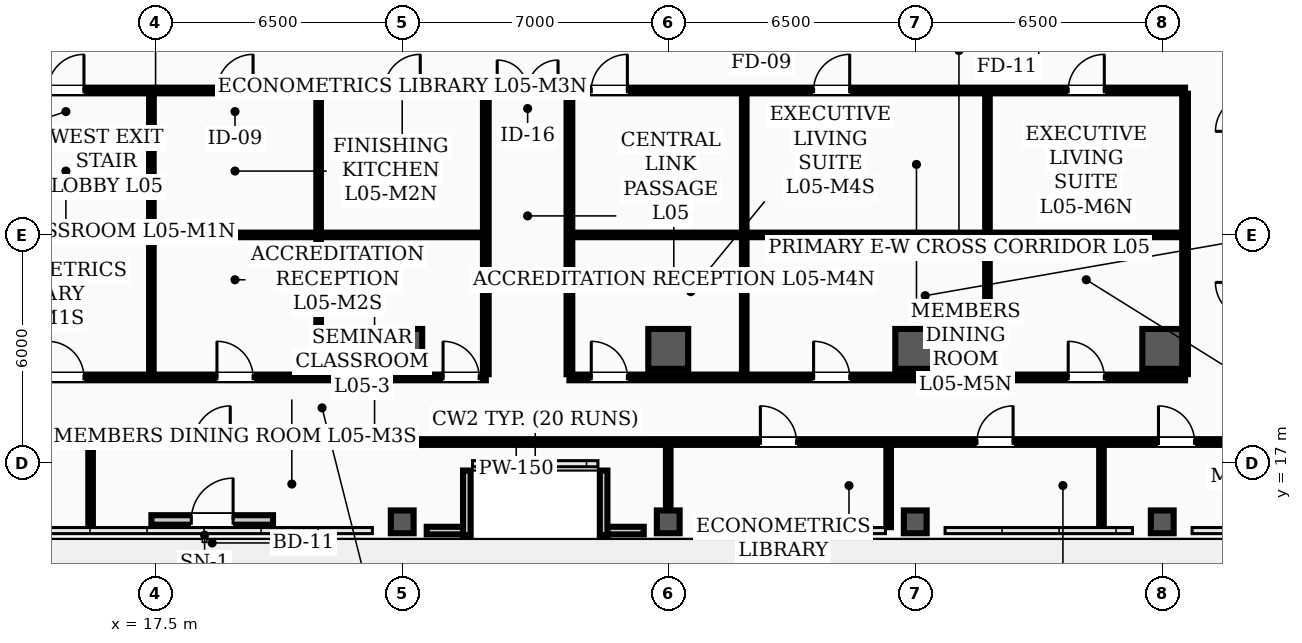
"""IFC4 building model, lengths in metres.
Left out: names, types, materials, properties, quantities, classifications, styles, units other than length and angle.
Written with IfcOpenShell. Run it as: python <this file> out.ifc"""

import sys

from ifc_helpers import new_model, si_unit, direction, frame, frame_2d, origin, origin_2d, place, context, subcontext, project, spatial, rectangle, hollow_rectangle, extrude, element, fill, save


model = new_model("IFC4")
c1 = context("Model", 3, precision=1e-05, world=origin(), true_north=direction((0.0, 1.0)))
c2 = subcontext(c1, "Body", "Model", "MODEL_VIEW")
j1 = project(units=[si_unit("LENGTHUNIT", "METRE"), si_unit("PLANEANGLEUNIT", "RADIAN")], contexts=[c1])
p1 = place(None, origin())
s1 = spatial("IfcSite", under=j1, at=p1, CompositionType="ELEMENT")
p2 = place(p1, origin())
s2 = spatial("IfcBuilding", under=s1, at=p2, CompositionType="ELEMENT")
p3 = place(p2, frame((0.0, 0.0, 22.0)))
s3 = spatial("IfcBuildingStorey", under=s2, at=p3, CompositionType="ELEMENT", Elevation=22.0)
for number, where, z_axis, x_axis in (
    (1, (24.0, 20.0, 0.0), (0.0, 0.0, 1.0), (1.0, 0.0, 0.0)),
    (2, (31.0, 20.0, 0.0), (0.0, 0.0, 1.0), (1.0, 0.0, 0.0)),
    (3, (37.5, 20.0, 0.0), (0.0, 0.0, 1.0), (1.0, 0.0, 0.0)),
    (4, (44.0, 20.0, 0.0), (0.0, 0.0, 1.0), (1.0, 0.0, 0.0)),
):
    element("IfcColumn", number, at=place(p3, frame(where, z_axis=z_axis, x_axis=x_axis)), inside=s3, PredefinedType="COLUMN", context=c2, shape_type="SweptSolid", body=[
        extrude(hollow_rectangle(XDim=1.05, YDim=1.05, WallThickness=0.038, InnerFilletRadius=0.019, OuterFilletRadius=0.057, at=origin_2d()), origin(), (0.0, 0.0, 1.0), 4.5),
    ])
for number, where, z_axis, x_axis in (
    (5, (24.0, 15.45, 0.0), (0.0, 0.0, 1.0), (1.0, 0.0, 0.0)),
    (6, (31.0, 15.45, 0.0), (0.0, 0.0, 1.0), (1.0, 0.0, 0.0)),
    (7, (37.5, 15.45, 0.0), (0.0, 0.0, 1.0), (1.0, 0.0, 0.0)),
    (8, (44.0, 15.45, 0.0), (0.0, 0.0, 1.0), (1.0, 0.0, 0.0)),
):
    element("IfcColumn", number, at=place(p3, frame(where, z_axis=z_axis, x_axis=x_axis)), inside=s3, PredefinedType="COLUMN", context=c2, shape_type="SweptSolid", body=[
        extrude(hollow_rectangle(XDim=0.6, YDim=0.6, WallThickness=0.026, InnerFilletRadius=0.013, OuterFilletRadius=0.039, at=origin_2d()), origin(), (0.0, 0.0, 1.0), 4.5),
    ])
for number, where, z_axis, x_axis in (
    (9, (24.645, 15.22, 0.0), (0.0, 0.0, 1.0), (1.0, 0.0, 0.0)),
    (10, (29.35, 15.22, 0.0), (0.0, 0.0, 1.0), (1.0, 0.0, 0.0)),
):
    element("IfcWall", number, at=place(p3, frame(where, z_axis=z_axis, x_axis=x_axis)), inside=s3, PredefinedType="PARAPET", context=c2, shape_type="SweptSolid", body=[
        extrude(rectangle(XDim=1.005, YDim=0.2, at=frame_2d((0.502, 0.0))), origin(), (0.0, 0.0, 1.0), 1.2),
    ])
for number, where, z_axis, x_axis in (
    (11, (25.7, 15.1, 0.0), (0.0, 0.0, 1.0), (0.0, 1.0, 0.0)),
    (12, (29.3, 16.8, 0.0), (0.0, 0.0, 1.0), (0.0, -1.0, 0.0)),
):
    element("IfcWall", number, at=place(p3, frame(where, z_axis=z_axis, x_axis=x_axis)), inside=s3, PredefinedType="PARAPET", context=c2, shape_type="SweptSolid", body=[
        extrude(rectangle(XDim=1.7, YDim=0.2, at=frame_2d((0.85, 0.0))), origin(), (0.0, 0.0, 1.0), 1.2),
    ])
p4 = place(p3, frame((17.4, 15.5, 0.0), z_axis=(0.0, 0.0, 1.0), x_axis=(1.0, 0.0, 0.0)))
e13 = element("IfcWall", 13, at=p4, inside=s3, PredefinedType="STANDARD", context=c2, shape_type="SweptSolid", body=[
    extrude(rectangle(XDim=3.2, YDim=0.25, at=frame_2d((1.6, 0.0))), origin(), (0.0, 0.0, 1.0), 3.2),
])
p5 = place(p4, frame((1.05, 0.0, 0.0)))
e14 = element("IfcOpeningElement", 14, at=p5, cuts=e13, PredefinedType="OPENING", context=c2, shape_type="SweptSolid", body=[
    extrude(rectangle(XDim=1.1, YDim=2.2, at=frame_2d((0.55, 1.1))), frame((0.0, 0.135, 0.0), z_axis=(0.0, -1.0, 0.0), x_axis=(1.0, 0.0, 0.0)), (0.0, 0.0, 1.0), 0.27),
])
p6 = place(p3, frame((12.9, 26.8, 0.0), z_axis=(0.0, 0.0, 1.0), x_axis=(1.0, 0.0, 0.0)))
e15 = element("IfcWall", 15, at=p6, inside=s3, PredefinedType="PARTITIONING", context=c2, shape_type="SweptSolid", body=[
    extrude(rectangle(XDim=31.7, YDim=0.15, at=frame_2d((15.85, 0.0))), origin(), (0.0, 0.0, 1.0), 3.7),
])
p7 = place(p6, frame((13.6, 0.0, 0.0)))
e16 = element("IfcOpeningElement", 16, at=p7, cuts=e15, PredefinedType="OPENING", context=c2, shape_type="SweptSolid", body=[
    extrude(rectangle(XDim=1.6, YDim=2.08, at=frame_2d((0.8, 1.04))), frame((0.0, 0.085, 0.0), z_axis=(0.0, -1.0, 0.0), x_axis=(1.0, 0.0, 0.0)), (0.0, 0.0, 1.0), 0.17),
])
p8 = place(p6, frame((1.775, 0.0, 0.0)))
e17 = element("IfcOpeningElement", 17, at=p8, cuts=e15, PredefinedType="OPENING", context=c2, shape_type="SweptSolid", body=[
    extrude(rectangle(XDim=0.95, YDim=2.08, at=frame_2d((0.475, 1.04))), frame((0.0, 0.085, 0.0), z_axis=(0.0, -1.0, 0.0), x_axis=(1.0, 0.0, 0.0)), (0.0, 0.0, 1.0), 0.17),
])
p9 = place(p6, frame((6.225, 0.0, 0.0)))
e18 = element("IfcOpeningElement", 18, at=p9, cuts=e15, PredefinedType="OPENING", context=c2, shape_type="SweptSolid", body=[
    extrude(rectangle(XDim=0.95, YDim=2.08, at=frame_2d((0.475, 1.04))), frame((0.0, 0.085, 0.0), z_axis=(0.0, -1.0, 0.0), x_axis=(1.0, 0.0, 0.0)), (0.0, 0.0, 1.0), 0.17),
])
p10 = place(p6, frame((10.625, 0.0, 0.0)))
e19 = element("IfcOpeningElement", 19, at=p10, cuts=e15, PredefinedType="OPENING", context=c2, shape_type="SweptSolid", body=[
    extrude(rectangle(XDim=0.95, YDim=2.08, at=frame_2d((0.475, 1.04))), frame((0.0, 0.085, 0.0), z_axis=(0.0, -1.0, 0.0), x_axis=(1.0, 0.0, 0.0)), (0.0, 0.0, 1.0), 0.17),
])
p11 = place(p6, frame((16.075, 0.0, 0.0)))
e20 = element("IfcOpeningElement", 20, at=p11, cuts=e15, PredefinedType="OPENING", context=c2, shape_type="SweptSolid", body=[
    extrude(rectangle(XDim=0.95, YDim=2.08, at=frame_2d((0.475, 1.04))), frame((0.0, 0.085, 0.0), z_axis=(0.0, -1.0, 0.0), x_axis=(1.0, 0.0, 0.0)), (0.0, 0.0, 1.0), 0.17),
])
p12 = place(p6, frame((21.925, 0.0, 0.0)))
e21 = element("IfcOpeningElement", 21, at=p12, cuts=e15, PredefinedType="OPENING", context=c2, shape_type="SweptSolid", body=[
    extrude(rectangle(XDim=0.95, YDim=2.08, at=frame_2d((0.475, 1.04))), frame((0.0, 0.085, 0.0), z_axis=(0.0, -1.0, 0.0), x_axis=(1.0, 0.0, 0.0)), (0.0, 0.0, 1.0), 0.17),
])
p13 = place(p6, frame((28.625, 0.0, 0.0)))
e22 = element("IfcOpeningElement", 22, at=p13, cuts=e15, PredefinedType="OPENING", context=c2, shape_type="SweptSolid", body=[
    extrude(rectangle(XDim=0.95, YDim=2.08, at=frame_2d((0.475, 1.04))), frame((0.0, 0.085, 0.0), z_axis=(0.0, -1.0, 0.0), x_axis=(1.0, 0.0, 0.0)), (0.0, 0.0, 1.0), 0.17),
])
p14 = place(p3, frame((4.66, 17.55, 0.0), z_axis=(0.0, 0.0, 1.0), x_axis=(1.0, 0.0, 0.0)))
e23 = element("IfcWall", 23, at=p14, inside=s3, PredefinedType="PARTITIONING", context=c2, shape_type="SweptSolid", body=[
    extrude(rectangle(XDim=44.68, YDim=0.15, at=frame_2d((22.34, 0.0))), origin(), (0.0, 0.0, 1.0), 3.7),
])
p15 = place(p14, frame((6.74, 0.0, 0.0)))
e24 = element("IfcOpeningElement", 24, at=p15, cuts=e23, PredefinedType="OPENING", context=c2, shape_type="SweptSolid", body=[
    extrude(rectangle(XDim=0.95, YDim=2.08, at=frame_2d((0.475, 1.04))), frame((0.0, 0.085, 0.0), z_axis=(0.0, -1.0, 0.0), x_axis=(1.0, 0.0, 0.0)), (0.0, 0.0, 1.0), 0.17),
])
p16 = place(p14, frame((13.865, 0.0, 0.0)))
e25 = element("IfcOpeningElement", 25, at=p16, cuts=e23, PredefinedType="OPENING", context=c2, shape_type="SweptSolid", body=[
    extrude(rectangle(XDim=0.95, YDim=2.08, at=frame_2d((0.475, 1.04))), frame((0.0, 0.085, 0.0), z_axis=(0.0, -1.0, 0.0), x_axis=(1.0, 0.0, 0.0)), (0.0, 0.0, 1.0), 0.17),
])
p17 = place(p14, frame((28.765, 0.0, 0.0)))
e26 = element("IfcOpeningElement", 26, at=p17, cuts=e23, PredefinedType="OPENING", context=c2, shape_type="SweptSolid", body=[
    extrude(rectangle(XDim=0.95, YDim=2.08, at=frame_2d((0.475, 1.04))), frame((0.0, 0.085, 0.0), z_axis=(0.0, -1.0, 0.0), x_axis=(1.0, 0.0, 0.0)), (0.0, 0.0, 1.0), 0.17),
])
p18 = place(p14, frame((34.465, 0.0, 0.0)))
e27 = element("IfcOpeningElement", 27, at=p18, cuts=e23, PredefinedType="OPENING", context=c2, shape_type="SweptSolid", body=[
    extrude(rectangle(XDim=0.95, YDim=2.08, at=frame_2d((0.475, 1.04))), frame((0.0, 0.085, 0.0), z_axis=(0.0, -1.0, 0.0), x_axis=(1.0, 0.0, 0.0)), (0.0, 0.0, 1.0), 0.17),
])
p19 = place(p14, frame((39.24, 0.0, 0.0)))
e28 = element("IfcOpeningElement", 28, at=p19, cuts=e23, PredefinedType="OPENING", context=c2, shape_type="SweptSolid", body=[
    extrude(rectangle(XDim=0.95, YDim=2.08, at=frame_2d((0.475, 1.04))), frame((0.0, 0.085, 0.0), z_axis=(0.0, -1.0, 0.0), x_axis=(1.0, 0.0, 0.0)), (0.0, 0.0, 1.0), 0.17),
])
p20 = place(p3, frame((12.9, 19.25, 0.0), z_axis=(0.0, 0.0, 1.0), x_axis=(1.0, 0.0, 0.0)))
e29 = element("IfcWall", 29, at=p20, inside=s3, PredefinedType="PARTITIONING", context=c2, shape_type="SweptSolid", body=[
    extrude(rectangle(XDim=13.3, YDim=0.15, at=frame_2d((6.65, 0.0))), origin(), (0.0, 0.0, 1.0), 3.7),
])
p21 = place(p20, frame((1.775, 0.0, 0.0)))
e30 = element("IfcOpeningElement", 30, at=p21, cuts=e29, PredefinedType="OPENING", context=c2, shape_type="SweptSolid", body=[
    extrude(rectangle(XDim=0.95, YDim=2.08, at=frame_2d((0.475, 1.04))), frame((0.0, 0.085, 0.0), z_axis=(0.0, -1.0, 0.0), x_axis=(1.0, 0.0, 0.0)), (0.0, 0.0, 1.0), 0.17),
])
p22 = place(p20, frame((6.225, 0.0, 0.0)))
e31 = element("IfcOpeningElement", 31, at=p22, cuts=e29, PredefinedType="OPENING", context=c2, shape_type="SweptSolid", body=[
    extrude(rectangle(XDim=0.95, YDim=2.08, at=frame_2d((0.475, 1.04))), frame((0.0, 0.085, 0.0), z_axis=(0.0, -1.0, 0.0), x_axis=(1.0, 0.0, 0.0)), (0.0, 0.0, 1.0), 0.17),
])
p23 = place(p20, frame((12.175, 0.0, 0.0)))
e32 = element("IfcOpeningElement", 32, at=p23, cuts=e29, PredefinedType="OPENING", context=c2, shape_type="SweptSolid", body=[
    extrude(rectangle(XDim=0.95, YDim=2.08, at=frame_2d((0.475, 1.04))), frame((0.0, 0.085, 0.0), z_axis=(0.0, -1.0, 0.0), x_axis=(1.0, 0.0, 0.0)), (0.0, 0.0, 1.0), 0.17),
])
p24 = place(p3, frame((28.4, 19.25, 0.0), z_axis=(0.0, 0.0, 1.0), x_axis=(1.0, 0.0, 0.0)))
e33 = element("IfcWall", 33, at=p24, inside=s3, PredefinedType="PARTITIONING", context=c2, shape_type="SweptSolid", body=[
    extrude(rectangle(XDim=16.2, YDim=0.15, at=frame_2d((8.1, 0.0))), origin(), (0.0, 0.0, 1.0), 3.7),
])
p25 = place(p24, frame((0.575, 0.0, 0.0)))
e34 = element("IfcOpeningElement", 34, at=p25, cuts=e33, PredefinedType="OPENING", context=c2, shape_type="SweptSolid", body=[
    extrude(rectangle(XDim=0.95, YDim=2.08, at=frame_2d((0.475, 1.04))), frame((0.0, 0.085, 0.0), z_axis=(0.0, -1.0, 0.0), x_axis=(1.0, 0.0, 0.0)), (0.0, 0.0, 1.0), 0.17),
])
p26 = place(p24, frame((6.425, 0.0, 0.0)))
e35 = element("IfcOpeningElement", 35, at=p26, cuts=e33, PredefinedType="OPENING", context=c2, shape_type="SweptSolid", body=[
    extrude(rectangle(XDim=0.95, YDim=2.08, at=frame_2d((0.475, 1.04))), frame((0.0, 0.085, 0.0), z_axis=(0.0, -1.0, 0.0), x_axis=(1.0, 0.0, 0.0)), (0.0, 0.0, 1.0), 0.17),
])
p27 = place(p24, frame((13.125, 0.0, 0.0)))
e36 = element("IfcOpeningElement", 36, at=p27, cuts=e33, PredefinedType="OPENING", context=c2, shape_type="SweptSolid", body=[
    extrude(rectangle(XDim=0.95, YDim=2.08, at=frame_2d((0.475, 1.04))), frame((0.0, 0.085, 0.0), z_axis=(0.0, -1.0, 0.0), x_axis=(1.0, 0.0, 0.0)), (0.0, 0.0, 1.0), 0.17),
])
p28 = place(p3, frame((12.9, 23.0, 0.0), z_axis=(0.0, 0.0, 1.0), x_axis=(1.0, 0.0, 0.0)))
e37 = element("IfcWall", 37, at=p28, inside=s3, PredefinedType="PARTITIONING", context=c2, shape_type="SweptSolid", body=[
    extrude(rectangle(XDim=4.5, YDim=0.12, at=frame_2d((2.25, 0.0))), origin(), (0.0, 0.0, 1.0), 3.7),
])
p29 = place(p3, frame((17.4, 23.0, 0.0), z_axis=(0.0, 0.0, 1.0), x_axis=(1.0, 0.0, 0.0)))
e38 = element("IfcWall", 38, at=p29, inside=s3, PredefinedType="PARTITIONING", context=c2, shape_type="SweptSolid", body=[
    extrude(rectangle(XDim=4.4, YDim=0.12, at=frame_2d((2.2, 0.0))), origin(), (0.0, 0.0, 1.0), 3.9),
])
p30 = place(p3, frame((21.8, 23.0, 0.0), z_axis=(0.0, 0.0, 1.0), x_axis=(1.0, 0.0, 0.0)))
e39 = element("IfcWall", 39, at=p30, inside=s3, PredefinedType="PARTITIONING", context=c2, shape_type="SweptSolid", body=[
    extrude(rectangle(XDim=4.4, YDim=0.12, at=frame_2d((2.2, 0.0))), origin(), (0.0, 0.0, 1.0), 3.7),
])
p31 = place(p3, frame((28.4, 23.0, 0.0), z_axis=(0.0, 0.0, 1.0), x_axis=(1.0, 0.0, 0.0)))
e40 = element("IfcWall", 40, at=p31, inside=s3, PredefinedType="PARTITIONING", context=c2, shape_type="SweptSolid", body=[
    extrude(rectangle(XDim=4.6, YDim=0.12, at=frame_2d((2.3, 0.0))), origin(), (0.0, 0.0, 1.0), 3.7),
])
p32 = place(p3, frame((33.0, 23.0, 0.0), z_axis=(0.0, 0.0, 1.0), x_axis=(1.0, 0.0, 0.0)))
e41 = element("IfcWall", 41, at=p32, inside=s3, PredefinedType="PARTITIONING", context=c2, shape_type="SweptSolid", body=[
    extrude(rectangle(XDim=6.4, YDim=0.12, at=frame_2d((3.2, 0.0))), origin(), (0.0, 0.0, 1.0), 3.7),
])
p33 = place(p3, frame((39.4, 23.0, 0.0), z_axis=(0.0, 0.0, 1.0), x_axis=(1.0, 0.0, 0.0)))
e42 = element("IfcWall", 42, at=p33, inside=s3, PredefinedType="PARTITIONING", context=c2, shape_type="SweptSolid", body=[
    extrude(rectangle(XDim=5.2, YDim=0.12, at=frame_2d((2.6, 0.0))), origin(), (0.0, 0.0, 1.0), 3.7),
])
for number, where, z_axis, x_axis in (
    (43, (26.2, 19.335, 0.0), (0.0, 0.0, 1.0), (0.0, 1.0, 0.0)),
    (44, (28.4, 19.335, 0.0), (0.0, 0.0, 1.0), (0.0, 1.0, 0.0)),
    (45, (44.6, 19.335, 0.0), (0.0, 0.0, 1.0), (0.0, 1.0, 0.0)),
):
    element("IfcWall", number, at=place(p3, frame(where, z_axis=z_axis, x_axis=x_axis)), inside=s3, PredefinedType="PARTITIONING", context=c2, shape_type="SweptSolid", body=[
        extrude(rectangle(XDim=7.38, YDim=0.15, at=frame_2d((3.69, 0.0))), origin(), (0.0, 0.0, 1.0), 3.6),
    ])
p34 = place(p3, frame((15.8, 15.31, 0.0), z_axis=(0.0, 0.0, 1.0), x_axis=(0.0, 1.0, 0.0)))
e46 = element("IfcWall", 46, at=p34, inside=s3, PredefinedType="PARTITIONING", context=c2, shape_type="SweptSolid", body=[
    extrude(rectangle(XDim=2.155, YDim=0.12, at=frame_2d((1.078, 0.0))), origin(), (0.0, 0.0, 1.0), 3.812),
])
p35 = place(p3, frame((31.0, 15.31, 0.0), z_axis=(0.0, 0.0, 1.0), x_axis=(0.0, 1.0, 0.0)))
e47 = element("IfcWall", 47, at=p35, inside=s3, PredefinedType="PARTITIONING", context=c2, shape_type="SweptSolid", body=[
    extrude(rectangle(XDim=2.155, YDim=0.12, at=frame_2d((1.078, 0.0))), origin(), (0.0, 0.0, 1.0), 3.7),
])
for number, where, z_axis, x_axis in (
    (48, (36.8, 15.31, 0.0), (0.0, 0.0, 1.0), (0.0, 1.0, 0.0)),
    (49, (42.4, 15.31, 0.0), (0.0, 0.0, 1.0), (0.0, 1.0, 0.0)),
):
    element("IfcWall", number, at=place(p3, frame(where, z_axis=z_axis, x_axis=x_axis)), inside=s3, PredefinedType="PARTITIONING", context=c2, shape_type="SweptSolid", body=[
        extrude(rectangle(XDim=2.155, YDim=0.12, at=frame_2d((1.078, 0.0))), origin(), (0.0, 0.0, 1.0), 3.812),
    ])
for number, where, z_axis, x_axis in (
    (50, (17.4, 19.335, 0.0), (0.0, 0.0, 1.0), (0.0, 1.0, 0.0)),
    (51, (21.8, 19.335, 0.0), (0.0, 0.0, 1.0), (0.0, 1.0, 0.0)),
    (52, (33.0, 19.335, 0.0), (0.0, 0.0, 1.0), (0.0, 1.0, 0.0)),
    (53, (39.4, 19.335, 0.0), (0.0, 0.0, 1.0), (0.0, 1.0, 0.0)),
):
    element("IfcWall", number, at=place(p3, frame(where, z_axis=z_axis, x_axis=x_axis)), inside=s3, PredefinedType="PARTITIONING", context=c2, shape_type="SweptSolid", body=[
        extrude(rectangle(XDim=7.38, YDim=0.12, at=frame_2d((3.69, 0.0))), origin(), (0.0, 0.0, 1.0), 3.6),
    ])
p36 = place(p5, origin())
e54 = element("IfcDoor", 54, at=p36, inside=s3, OperationType="SINGLE_SWING_RIGHT", PredefinedType="DOOR", context=c2, shape_type="SweptSolid", body=[
    extrude(rectangle(XDim=1.1, YDim=2.2, at=frame_2d((0.55, 1.1))), frame((0.0, 0.025, 0.0), z_axis=(0.0, -1.0, 0.0), x_axis=(1.0, 0.0, 0.0)), (0.0, 0.0, 1.0), 0.05),
])
fill(e14, e54)
p37 = place(p7, origin())
e55 = element("IfcDoor", 55, at=p37, inside=s3, OperationType="DOUBLE_DOOR_SINGLE_SWING", PredefinedType="DOOR", context=c2, shape_type="SweptSolid", body=[
    extrude(rectangle(XDim=1.6, YDim=2.08, at=frame_2d((0.8, 1.04))), frame((0.0, 0.025, 0.0), z_axis=(0.0, -1.0, 0.0), x_axis=(1.0, 0.0, 0.0)), (0.0, 0.0, 1.0), 0.05),
])
fill(e16, e55)
p38 = place(p16, origin())
e56 = element("IfcDoor", 56, at=p38, inside=s3, OperationType="SINGLE_SWING_RIGHT", PredefinedType="DOOR", context=c2, shape_type="SweptSolid", body=[
    extrude(rectangle(XDim=0.95, YDim=2.08, at=frame_2d((0.475, 1.04))), frame((0.0, 0.025, 0.0), z_axis=(0.0, -1.0, 0.0), x_axis=(1.0, 0.0, 0.0)), (0.0, 0.0, 1.0), 0.05),
])
fill(e25, e56)
p39 = place(p17, origin())
e57 = element("IfcDoor", 57, at=p39, inside=s3, OperationType="SINGLE_SWING_LEFT", PredefinedType="DOOR", context=c2, shape_type="SweptSolid", body=[
    extrude(rectangle(XDim=0.95, YDim=2.08, at=frame_2d((0.475, 1.04))), frame((0.0, 0.025, 0.0), z_axis=(0.0, -1.0, 0.0), x_axis=(1.0, 0.0, 0.0)), (0.0, 0.0, 1.0), 0.05),
])
fill(e26, e57)
p40 = place(p18, origin())
e58 = element("IfcDoor", 58, at=p40, inside=s3, OperationType="SINGLE_SWING_RIGHT", PredefinedType="DOOR", context=c2, shape_type="SweptSolid", body=[
    extrude(rectangle(XDim=0.95, YDim=2.08, at=frame_2d((0.475, 1.04))), frame((0.0, 0.025, 0.0), z_axis=(0.0, -1.0, 0.0), x_axis=(1.0, 0.0, 0.0)), (0.0, 0.0, 1.0), 0.05),
])
fill(e27, e58)
p41 = place(p19, origin())
e59 = element("IfcDoor", 59, at=p41, inside=s3, OperationType="SINGLE_SWING_LEFT", PredefinedType="DOOR", context=c2, shape_type="SweptSolid", body=[
    extrude(rectangle(XDim=0.95, YDim=2.08, at=frame_2d((0.475, 1.04))), frame((0.0, 0.025, 0.0), z_axis=(0.0, -1.0, 0.0), x_axis=(1.0, 0.0, 0.0)), (0.0, 0.0, 1.0), 0.05),
])
fill(e28, e59)
p42 = place(p8, origin())
e60 = element("IfcDoor", 60, at=p42, inside=s3, OperationType="SINGLE_SWING_RIGHT", PredefinedType="DOOR", context=c2, shape_type="SweptSolid", body=[
    extrude(rectangle(XDim=0.95, YDim=2.08, at=frame_2d((0.475, 1.04))), frame((0.0, 0.025, 0.0), z_axis=(0.0, -1.0, 0.0), x_axis=(1.0, 0.0, 0.0)), (0.0, 0.0, 1.0), 0.05),
])
fill(e17, e60)
p43 = place(p21, origin())
e61 = element("IfcDoor", 61, at=p43, inside=s3, OperationType="SINGLE_SWING_LEFT", PredefinedType="DOOR", context=c2, shape_type="SweptSolid", body=[
    extrude(rectangle(XDim=0.95, YDim=2.08, at=frame_2d((0.475, 1.04))), frame((0.0, 0.025, 0.0), z_axis=(0.0, -1.0, 0.0), x_axis=(1.0, 0.0, 0.0)), (0.0, 0.0, 1.0), 0.05),
])
fill(e30, e61)
p44 = place(p9, origin())
e62 = element("IfcDoor", 62, at=p44, inside=s3, OperationType="SINGLE_SWING_RIGHT", PredefinedType="DOOR", context=c2, shape_type="SweptSolid", body=[
    extrude(rectangle(XDim=0.95, YDim=2.08, at=frame_2d((0.475, 1.04))), frame((0.0, 0.025, 0.0), z_axis=(0.0, -1.0, 0.0), x_axis=(1.0, 0.0, 0.0)), (0.0, 0.0, 1.0), 0.05),
])
fill(e18, e62)
p45 = place(p22, origin())
e63 = element("IfcDoor", 63, at=p45, inside=s3, OperationType="SINGLE_SWING_LEFT", PredefinedType="DOOR", context=c2, shape_type="SweptSolid", body=[
    extrude(rectangle(XDim=0.95, YDim=2.08, at=frame_2d((0.475, 1.04))), frame((0.0, 0.025, 0.0), z_axis=(0.0, -1.0, 0.0), x_axis=(1.0, 0.0, 0.0)), (0.0, 0.0, 1.0), 0.05),
])
fill(e31, e63)
p46 = place(p10, origin())
e64 = element("IfcDoor", 64, at=p46, inside=s3, OperationType="SINGLE_SWING_RIGHT", PredefinedType="DOOR", context=c2, shape_type="SweptSolid", body=[
    extrude(rectangle(XDim=0.95, YDim=2.08, at=frame_2d((0.475, 1.04))), frame((0.0, 0.025, 0.0), z_axis=(0.0, -1.0, 0.0), x_axis=(1.0, 0.0, 0.0)), (0.0, 0.0, 1.0), 0.05),
])
fill(e19, e64)
p47 = place(p23, origin())
e65 = element("IfcDoor", 65, at=p47, inside=s3, OperationType="SINGLE_SWING_LEFT", PredefinedType="DOOR", context=c2, shape_type="SweptSolid", body=[
    extrude(rectangle(XDim=0.95, YDim=2.08, at=frame_2d((0.475, 1.04))), frame((0.0, 0.025, 0.0), z_axis=(0.0, -1.0, 0.0), x_axis=(1.0, 0.0, 0.0)), (0.0, 0.0, 1.0), 0.05),
])
fill(e32, e65)
p48 = place(p11, origin())
e66 = element("IfcDoor", 66, at=p48, inside=s3, OperationType="SINGLE_SWING_RIGHT", PredefinedType="DOOR", context=c2, shape_type="SweptSolid", body=[
    extrude(rectangle(XDim=0.95, YDim=2.08, at=frame_2d((0.475, 1.04))), frame((0.0, 0.025, 0.0), z_axis=(0.0, -1.0, 0.0), x_axis=(1.0, 0.0, 0.0)), (0.0, 0.0, 1.0), 0.05),
])
fill(e20, e66)
p49 = place(p25, origin())
e67 = element("IfcDoor", 67, at=p49, inside=s3, OperationType="SINGLE_SWING_LEFT", PredefinedType="DOOR", context=c2, shape_type="SweptSolid", body=[
    extrude(rectangle(XDim=0.95, YDim=2.08, at=frame_2d((0.475, 1.04))), frame((0.0, 0.025, 0.0), z_axis=(0.0, -1.0, 0.0), x_axis=(1.0, 0.0, 0.0)), (0.0, 0.0, 1.0), 0.05),
])
fill(e34, e67)
p50 = place(p12, origin())
e68 = element("IfcDoor", 68, at=p50, inside=s3, OperationType="SINGLE_SWING_RIGHT", PredefinedType="DOOR", context=c2, shape_type="SweptSolid", body=[
    extrude(rectangle(XDim=0.95, YDim=2.08, at=frame_2d((0.475, 1.04))), frame((0.0, 0.025, 0.0), z_axis=(0.0, -1.0, 0.0), x_axis=(1.0, 0.0, 0.0)), (0.0, 0.0, 1.0), 0.05),
])
fill(e21, e68)
p51 = place(p26, origin())
e69 = element("IfcDoor", 69, at=p51, inside=s3, OperationType="SINGLE_SWING_LEFT", PredefinedType="DOOR", context=c2, shape_type="SweptSolid", body=[
    extrude(rectangle(XDim=0.95, YDim=2.08, at=frame_2d((0.475, 1.04))), frame((0.0, 0.025, 0.0), z_axis=(0.0, -1.0, 0.0), x_axis=(1.0, 0.0, 0.0)), (0.0, 0.0, 1.0), 0.05),
])
fill(e35, e69)
p52 = place(p13, origin())
e70 = element("IfcDoor", 70, at=p52, inside=s3, OperationType="SINGLE_SWING_RIGHT", PredefinedType="DOOR", context=c2, shape_type="SweptSolid", body=[
    extrude(rectangle(XDim=0.95, YDim=2.08, at=frame_2d((0.475, 1.04))), frame((0.0, 0.025, 0.0), z_axis=(0.0, -1.0, 0.0), x_axis=(1.0, 0.0, 0.0)), (0.0, 0.0, 1.0), 0.05),
])
fill(e22, e70)
p53 = place(p27, origin())
e71 = element("IfcDoor", 71, at=p53, inside=s3, OperationType="SINGLE_SWING_LEFT", PredefinedType="DOOR", context=c2, shape_type="SweptSolid", body=[
    extrude(rectangle(XDim=0.95, YDim=2.08, at=frame_2d((0.475, 1.04))), frame((0.0, 0.025, 0.0), z_axis=(0.0, -1.0, 0.0), x_axis=(1.0, 0.0, 0.0)), (0.0, 0.0, 1.0), 0.05),
])
fill(e36, e71)
save(model, sys.argv[1])
